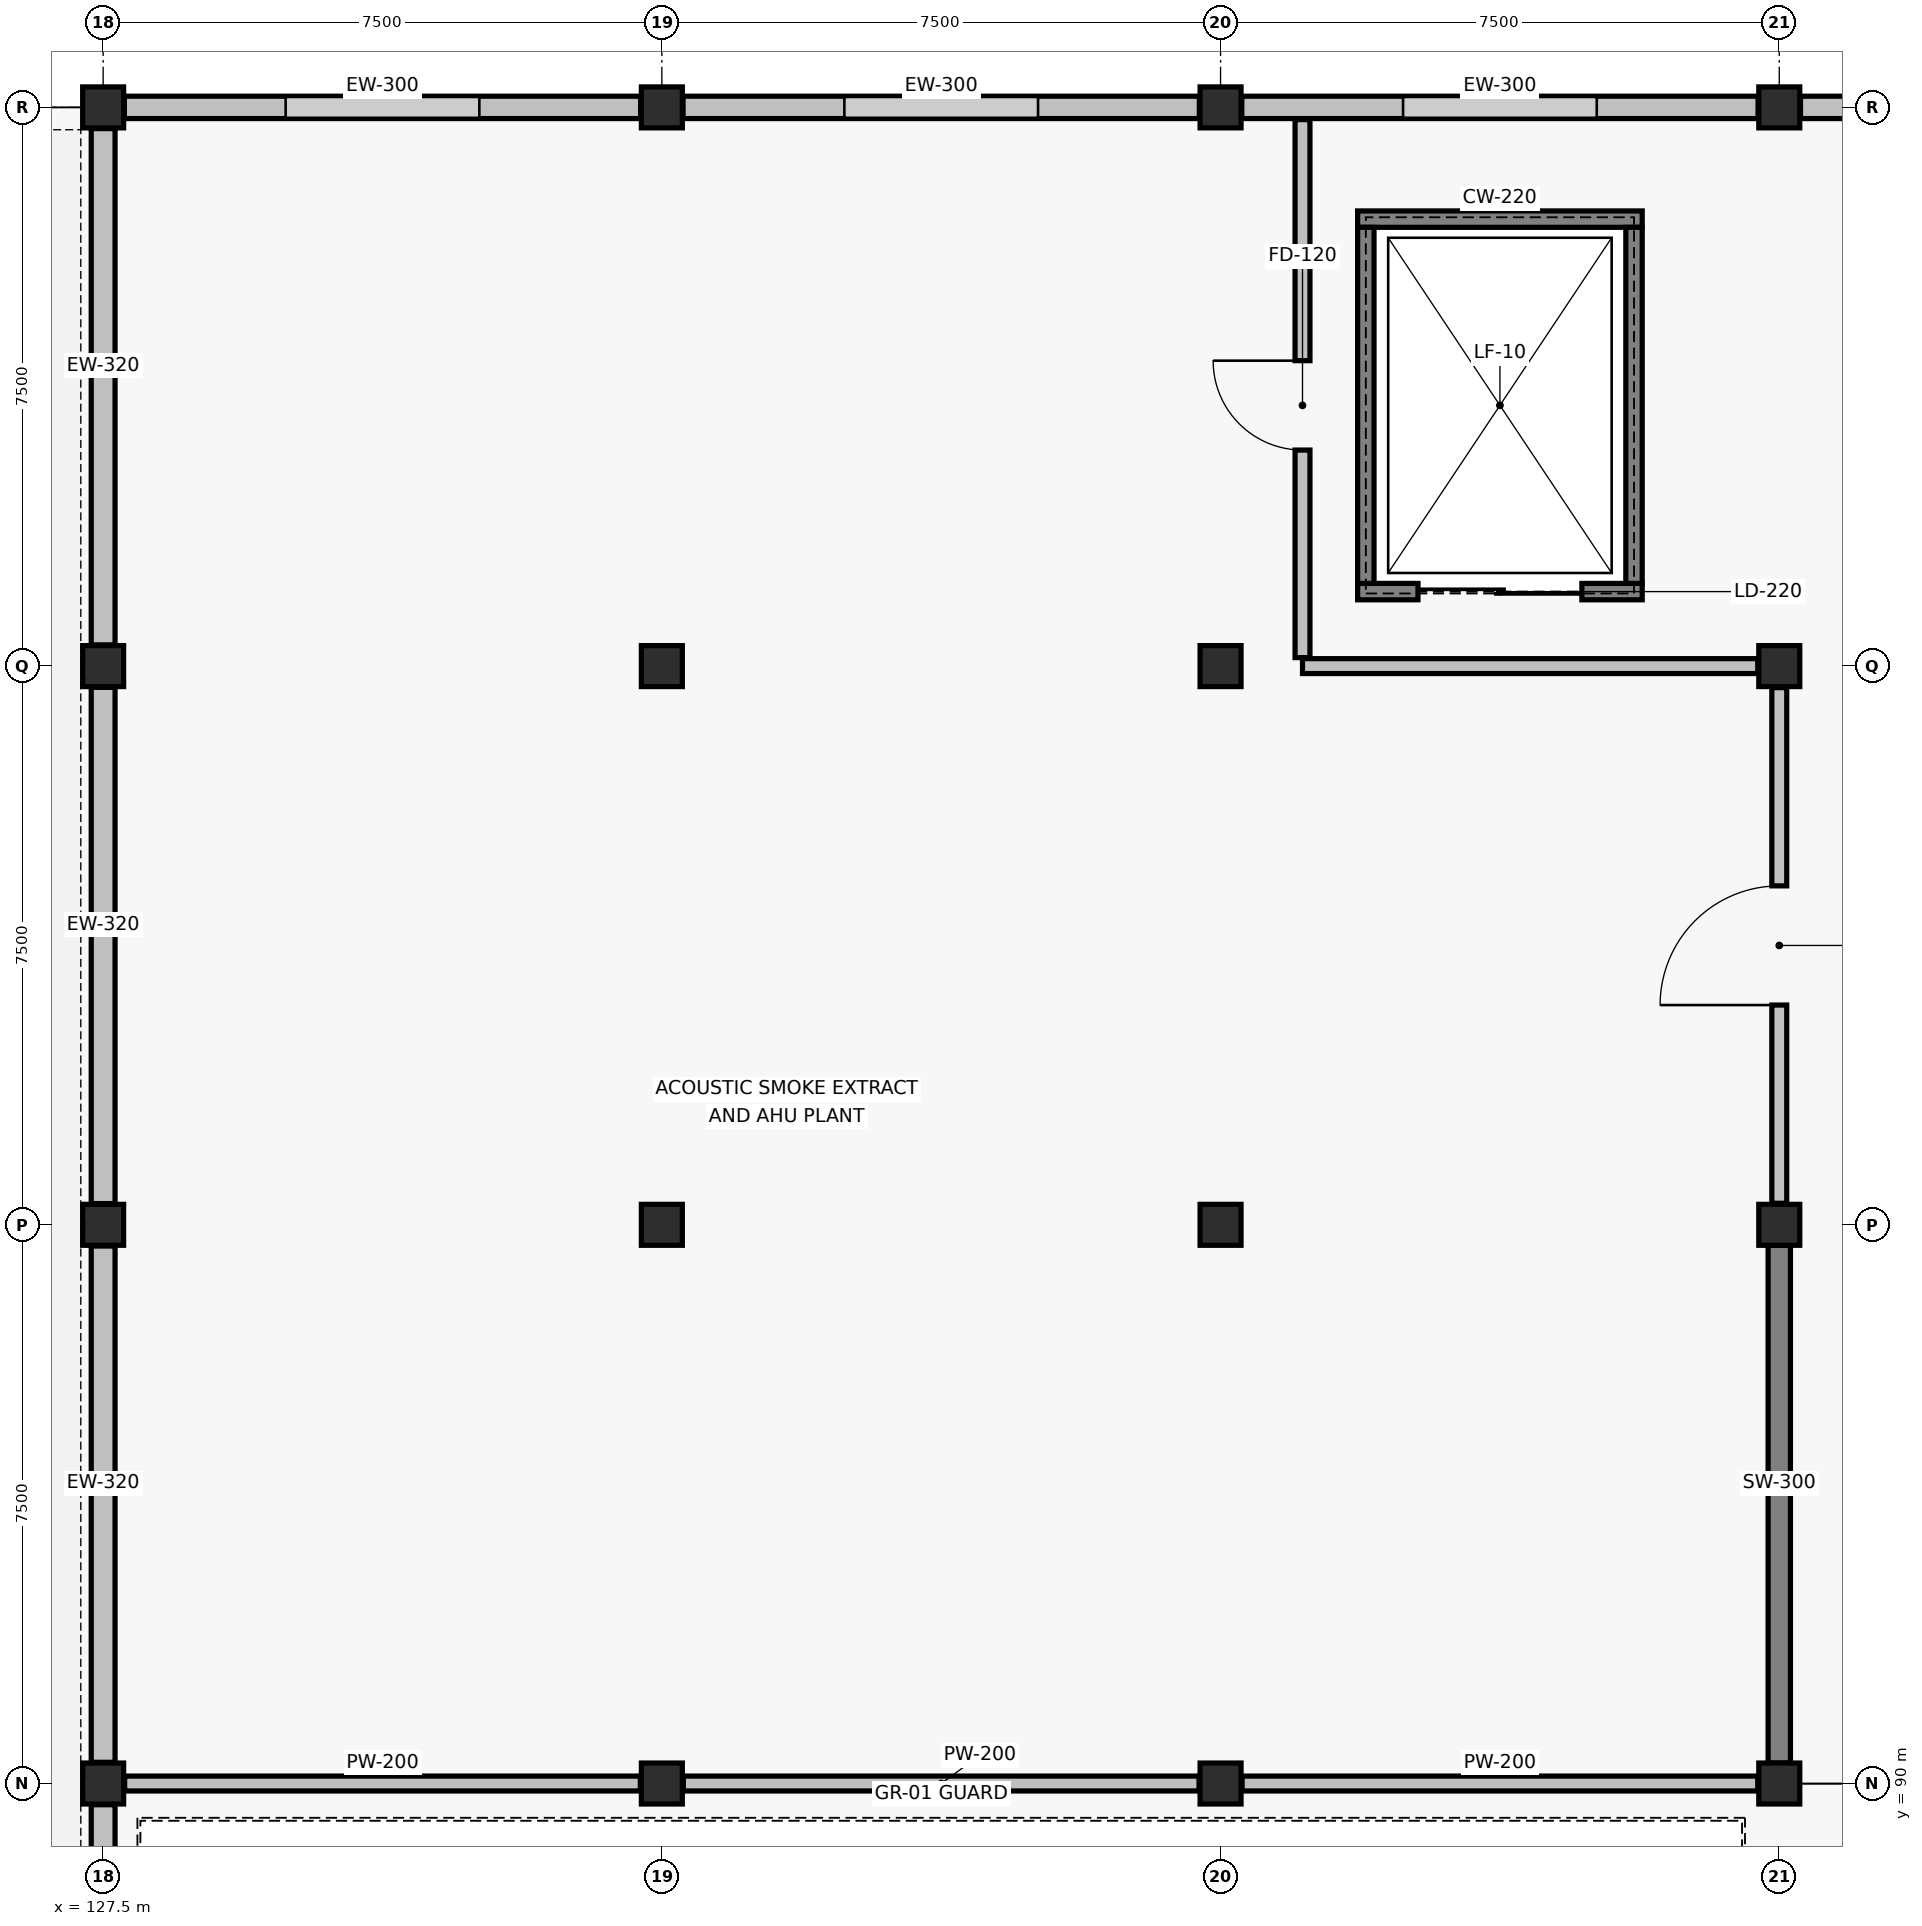
"""IFC4 building model, lengths in metres.
Left out: names, types, materials, properties, quantities, classifications, styles, units other than length and angle.
Written with IfcOpenShell. Run it as: python <this file> out.ifc"""

import sys

from ifc_helpers import new_model, si_unit, direction, frame, frame_2d, origin, origin_2d, place, context, subcontext, project, spatial, rectangle, extrude, element, fill, save


model = new_model("IFC4")
c1 = context("Model", 3, precision=1e-05, world=origin(), true_north=direction((0.0, 1.0)))
c2 = subcontext(c1, "Body", "Model", "MODEL_VIEW")
j1 = project(units=[si_unit("LENGTHUNIT", "METRE"), si_unit("PLANEANGLEUNIT", "RADIAN")], contexts=[c1])
p1 = place(None, origin())
s1 = spatial("IfcSite", under=j1, at=p1, CompositionType="ELEMENT")
p2 = place(p1, origin())
s2 = spatial("IfcBuilding", under=s1, at=p2, CompositionType="ELEMENT")
p3 = place(p2, frame((0.0, 0.0, 13.2)))
s3 = spatial("IfcBuildingStorey", under=s2, at=p3, CompositionType="ELEMENT", Elevation=13.2)
for number, where, z_axis, x_axis in (
    (1, (127.5, 90.0, 0.0), (0.0, 0.0, 1.0), (1.0, 0.0, 0.0)),
    (2, (127.5, 97.5, 0.0), (0.0, 0.0, 1.0), (1.0, 0.0, 0.0)),
    (3, (127.5, 105.0, 0.0), (0.0, 0.0, 1.0), (1.0, 0.0, 0.0)),
    (4, (127.5, 112.5, 0.0), (0.0, 0.0, 1.0), (1.0, 0.0, 0.0)),
    (5, (135.0, 90.0, 0.0), (0.0, 0.0, 1.0), (1.0, 0.0, 0.0)),
    (6, (135.0, 97.5, 0.0), (0.0, 0.0, 1.0), (1.0, 0.0, 0.0)),
    (7, (135.0, 105.0, 0.0), (0.0, 0.0, 1.0), (1.0, 0.0, 0.0)),
    (8, (135.0, 112.5, 0.0), (0.0, 0.0, 1.0), (1.0, 0.0, 0.0)),
    (9, (142.5, 90.0, 0.0), (0.0, 0.0, 1.0), (1.0, 0.0, 0.0)),
    (10, (142.5, 97.5, 0.0), (0.0, 0.0, 1.0), (1.0, 0.0, 0.0)),
    (11, (142.5, 105.0, 0.0), (0.0, 0.0, 1.0), (1.0, 0.0, 0.0)),
    (12, (142.5, 112.5, 0.0), (0.0, 0.0, 1.0), (1.0, 0.0, 0.0)),
    (13, (150.0, 90.0, 0.0), (0.0, 0.0, 1.0), (1.0, 0.0, 0.0)),
    (14, (150.0, 97.5, 0.0), (0.0, 0.0, 1.0), (1.0, 0.0, 0.0)),
    (15, (150.0, 105.0, 0.0), (0.0, 0.0, 1.0), (1.0, 0.0, 0.0)),
    (16, (150.0, 112.5, 0.0), (0.0, 0.0, 1.0), (1.0, 0.0, 0.0)),
):
    element("IfcColumn", number, at=place(p3, frame(where, z_axis=z_axis, x_axis=x_axis)), inside=s3, PredefinedType="COLUMN", context=c2, shape_type="SweptSolid", body=[
        extrude(rectangle(XDim=0.55, YDim=0.55, at=origin_2d()), origin(), (0.0, 0.0, 1.0), 3.9),
    ])
p4 = place(p3, frame((150.0, 90.275, 0.0), z_axis=(0.0, 0.0, 1.0), x_axis=(0.0, 1.0, 0.0)))
e17 = element("IfcWall", 17, at=p4, inside=s3, PredefinedType="SHEAR", context=c2, shape_type="SweptSolid", body=[
    extrude(rectangle(XDim=6.95, YDim=0.3, at=frame_2d((3.475, 0.0))), origin(), (0.0, 0.0, 1.0), 3.6),
])
for number, where, z_axis, x_axis in (
    (18, (127.785, 112.5, 0.0), (0.0, 0.0, 1.0), (1.0, 0.0, 0.0)),
    (19, (135.285, 112.5, 0.0), (0.0, 0.0, 1.0), (1.0, 0.0, 0.0)),
    (20, (142.785, 112.5, 0.0), (0.0, 0.0, 1.0), (1.0, 0.0, 0.0)),
    (21, (150.285, 112.5, 0.0), (0.0, 0.0, 1.0), (1.0, 0.0, 0.0)),
):
    element("IfcWall", number, at=place(p3, frame(where, z_axis=z_axis, x_axis=x_axis)), inside=s3, PredefinedType="SOLIDWALL", context=c2, shape_type="SweptSolid", body=[
        extrude(rectangle(XDim=6.93, YDim=0.3, at=frame_2d((3.465, 0.0))), origin(), (0.0, 0.0, 1.0), 2.84),
    ])
for number, where, z_axis, x_axis in (
    (22, (127.5, 82.785, 0.0), (0.0, 0.0, 1.0), (0.0, 1.0, 0.0)),
    (23, (127.5, 90.285, 0.0), (0.0, 0.0, 1.0), (0.0, 1.0, 0.0)),
    (24, (127.5, 97.785, 0.0), (0.0, 0.0, 1.0), (0.0, 1.0, 0.0)),
    (25, (127.5, 105.285, 0.0), (0.0, 0.0, 1.0), (0.0, 1.0, 0.0)),
):
    element("IfcWall", number, at=place(p3, frame(where, z_axis=z_axis, x_axis=x_axis)), inside=s3, PredefinedType="SOLIDWALL", context=c2, shape_type="SweptSolid", body=[
        extrude(rectangle(XDim=6.93, YDim=0.32, at=frame_2d((3.465, 0.0))), origin(), (0.0, 0.0, 1.0), 2.74),
    ])
p5 = place(p3, frame((144.34, 106.0, 0.0), z_axis=(0.0, 0.0, 1.0), x_axis=(1.0, 0.0, 0.0)))
e26 = element("IfcWall", 26, at=p5, inside=s3, PredefinedType="SOLIDWALL", context=c2, shape_type="SweptSolid", body=[
    extrude(rectangle(XDim=3.82, YDim=0.22, at=frame_2d((1.91, 0.0))), origin(), (0.0, 0.0, 1.0), 3.62),
])
p6 = place(p5, frame((0.81, 0.0, 0.0)))
e27 = element("IfcOpeningElement", 27, at=p6, cuts=e26, PredefinedType="OPENING", context=c2, shape_type="SweptSolid", body=[
    extrude(rectangle(XDim=2.2, YDim=2.35, at=frame_2d((1.1, 1.175))), frame((0.0, 0.12, 0.0), z_axis=(0.0, -1.0, 0.0), x_axis=(1.0, 0.0, 0.0)), (0.0, 0.0, 1.0), 0.24),
])
p7 = place(p3, frame((144.34, 111.0, 0.0), z_axis=(0.0, 0.0, 1.0), x_axis=(1.0, 0.0, 0.0)))
e28 = element("IfcWall", 28, at=p7, inside=s3, PredefinedType="SOLIDWALL", context=c2, shape_type="SweptSolid", body=[
    extrude(rectangle(XDim=3.82, YDim=0.22, at=frame_2d((1.91, 0.0))), origin(), (0.0, 0.0, 1.0), 3.62),
])
for number, where, z_axis, x_axis in (
    (29, (144.45, 106.11, 0.0), (0.0, 0.0, 1.0), (0.0, 1.0, 0.0)),
    (30, (148.05, 106.11, 0.0), (0.0, 0.0, 1.0), (0.0, 1.0, 0.0)),
):
    element("IfcWall", number, at=place(p3, frame(where, z_axis=z_axis, x_axis=x_axis)), inside=s3, PredefinedType="SOLIDWALL", context=c2, shape_type="SweptSolid", body=[
        extrude(rectangle(XDim=4.78, YDim=0.22, at=frame_2d((2.39, 0.0))), origin(), (0.0, 0.0, 1.0), 3.62),
    ])
p8 = place(p3, frame((143.6, 105.0, 0.0), z_axis=(0.0, 0.0, 1.0), x_axis=(1.0, 0.0, 0.0)))
e31 = element("IfcWall", 31, at=p8, inside=s3, PredefinedType="PARTITIONING", context=c2, shape_type="SweptSolid", body=[
    extrude(rectangle(XDim=6.111, YDim=0.2, at=frame_2d((3.055, 0.0))), origin(), (0.0, 0.0, 1.0), 2.54),
])
p9 = place(p3, frame((143.6, 105.114, 0.0), z_axis=(0.0, 0.0, 1.0), x_axis=(0.0, 1.0, 0.0)))
e32 = element("IfcWall", 32, at=p9, inside=s3, PredefinedType="PARTITIONING", context=c2, shape_type="SweptSolid", body=[
    extrude(rectangle(XDim=7.222, YDim=0.2, at=frame_2d((3.611, 0.0))), origin(), (0.0, 0.0, 1.0), 2.54),
])
p10 = place(p9, frame((2.786, 0.0, 0.0)))
e33 = element("IfcOpeningElement", 33, at=p10, cuts=e32, PredefinedType="OPENING", context=c2, shape_type="SweptSolid", body=[
    extrude(rectangle(XDim=1.2, YDim=2.15, at=frame_2d((0.6, 1.075))), frame((0.0, 0.11, 0.0), z_axis=(0.0, -1.0, 0.0), x_axis=(1.0, 0.0, 0.0)), (0.0, 0.0, 1.0), 0.22),
])
p11 = place(p3, frame((127.789, 90.0, 0.0), z_axis=(0.0, 0.0, 1.0), x_axis=(1.0, 0.0, 0.0)))
e34 = element("IfcWall", 34, at=p11, inside=s3, PredefinedType="PARTITIONING", context=c2, shape_type="SweptSolid", body=[
    extrude(rectangle(XDim=6.922, YDim=0.2, at=frame_2d((3.461, 0.0))), origin(), (0.0, 0.0, 1.0), 2.59),
])
for number, where, z_axis, x_axis in (
    (35, (135.289, 90.0, 0.0), (0.0, 0.0, 1.0), (1.0, 0.0, 0.0)),
    (36, (142.789, 90.0, 0.0), (0.0, 0.0, 1.0), (1.0, 0.0, 0.0)),
):
    element("IfcWall", number, at=place(p3, frame(where, z_axis=z_axis, x_axis=x_axis)), inside=s3, PredefinedType="PARTITIONING", context=c2, shape_type="SweptSolid", body=[
        extrude(rectangle(XDim=6.922, YDim=0.2, at=frame_2d((3.461, 0.0))), origin(), (0.0, 0.0, 1.0), 2.54),
    ])
p12 = place(p3, frame((150.0, 97.789, 0.0), z_axis=(0.0, 0.0, 1.0), x_axis=(0.0, 1.0, 0.0)))
e37 = element("IfcWall", 37, at=p12, inside=s3, PredefinedType="PARTITIONING", context=c2, shape_type="SweptSolid", body=[
    extrude(rectangle(XDim=6.922, YDim=0.2, at=frame_2d((3.461, 0.0))), origin(), (0.0, 0.0, 1.0), 2.54),
])
p13 = place(p12, frame((2.661, 0.0, 0.0)))
e38 = element("IfcOpeningElement", 38, at=p13, cuts=e37, PredefinedType="OPENING", context=c2, shape_type="SweptSolid", body=[
    extrude(rectangle(XDim=1.6, YDim=2.15, at=frame_2d((0.8, 1.075))), frame((0.0, 0.11, 0.0), z_axis=(0.0, -1.0, 0.0), x_axis=(1.0, 0.0, 0.0)), (0.0, 0.0, 1.0), 0.22),
])
p14 = place(p6, origin())
e39 = element("IfcDoor", 39, at=p14, inside=s3, OperationType="DOUBLE_DOOR_SLIDING", PredefinedType="DOOR", context=c2, shape_type="SweptSolid", body=[
    extrude(rectangle(XDim=2.2, YDim=2.35, at=frame_2d((1.1, 1.175))), frame((0.0, 0.025, 0.0), z_axis=(0.0, -1.0, 0.0), x_axis=(1.0, 0.0, 0.0)), (0.0, 0.0, 1.0), 0.05),
])
fill(e27, e39)
p15 = place(p10, origin())
e40 = element("IfcDoor", 40, at=p15, inside=s3, OperationType="SINGLE_SWING_RIGHT", PredefinedType="DOOR", context=c2, shape_type="SweptSolid", body=[
    extrude(rectangle(XDim=1.2, YDim=2.15, at=frame_2d((0.6, 1.075))), frame((0.0, 0.025, 0.0), z_axis=(0.0, -1.0, 0.0), x_axis=(1.0, 0.0, 0.0)), (0.0, 0.0, 1.0), 0.05),
])
fill(e33, e40)
p16 = place(p13, origin())
e41 = element("IfcDoor", 41, at=p16, inside=s3, OperationType="SINGLE_SWING_LEFT", PredefinedType="DOOR", context=c2, shape_type="SweptSolid", body=[
    extrude(rectangle(XDim=1.6, YDim=2.15, at=frame_2d((0.8, 1.075))), frame((0.0, 0.025, 0.0), z_axis=(0.0, -1.0, 0.0), x_axis=(1.0, 0.0, 0.0)), (0.0, 0.0, 1.0), 0.05),
])
fill(e38, e41)
save(model, sys.argv[1])
